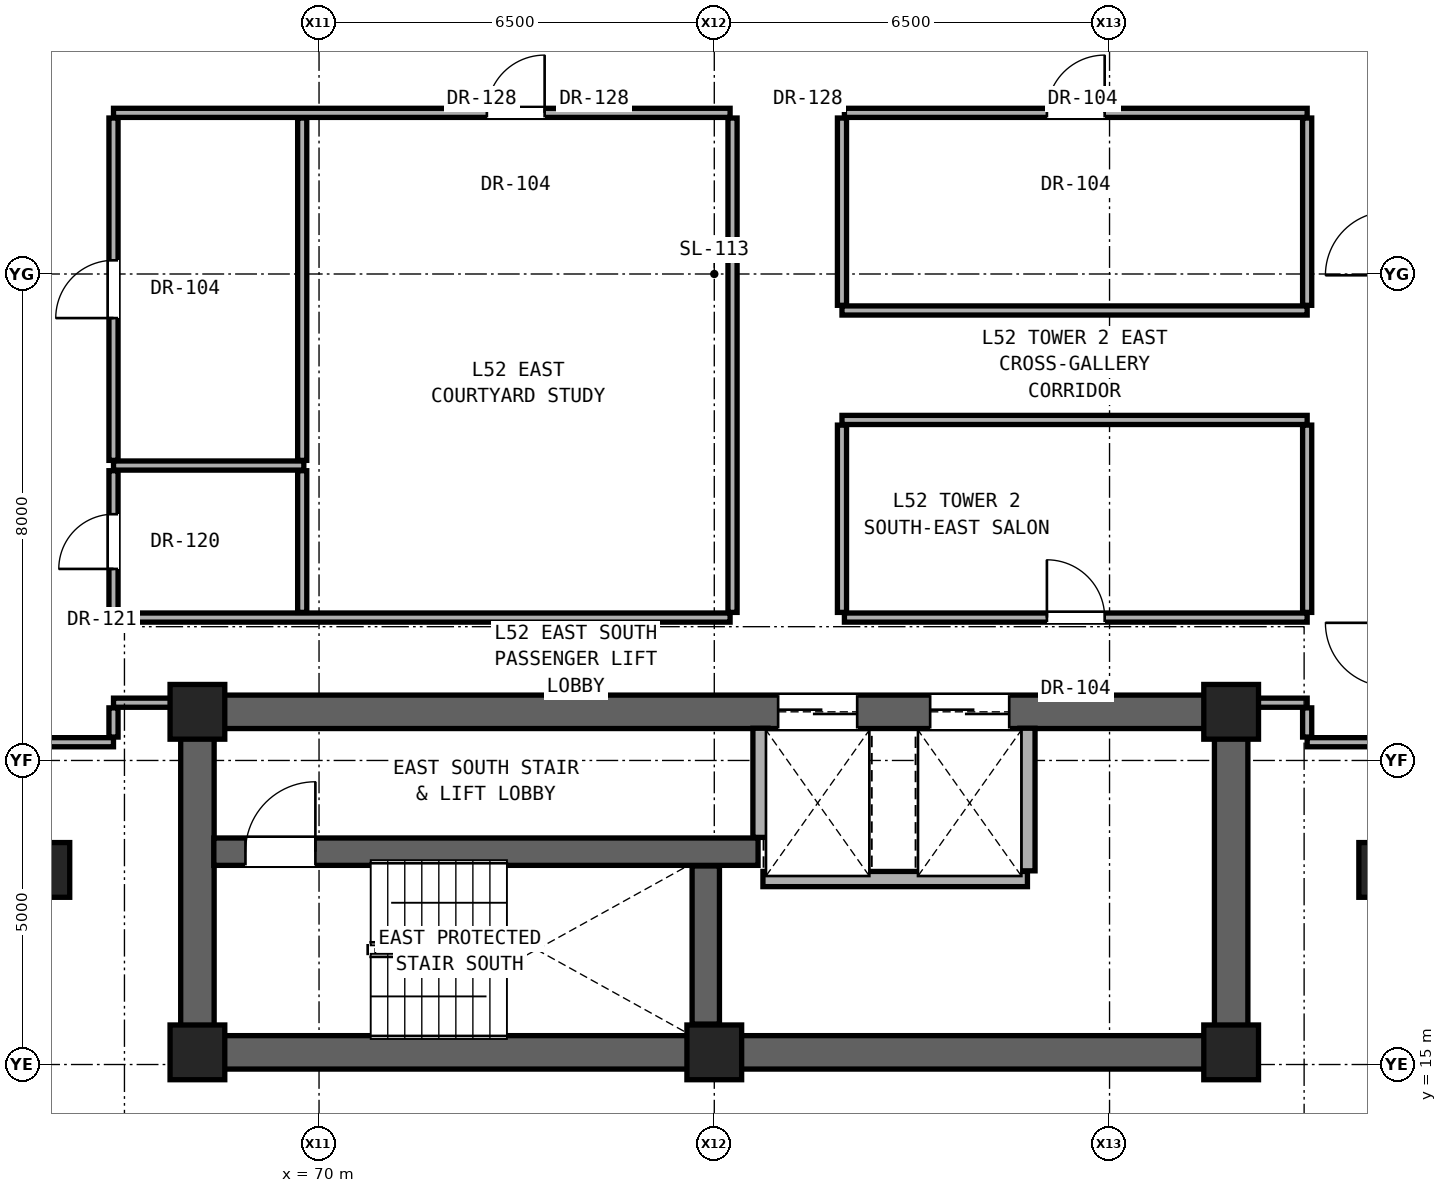
"""IFC4 building model, lengths in metres.
Left out: names, types, materials, properties, quantities, classifications, styles, units other than length and angle.
Written with IfcOpenShell. Run it as: python <this file> out.ifc"""

import sys

from ifc_helpers import new_model, si_unit, direction, frame, frame_2d, origin, origin_2d, place, context, subcontext, project, spatial, rectangle, extrude, element, fill, save


model = new_model("IFC4")
c1 = context("Model", 3, precision=1e-05, world=origin(), true_north=direction((0.0, 1.0)))
c2 = subcontext(c1, "Body", "Model", "MODEL_VIEW")
j1 = project(units=[si_unit("LENGTHUNIT", "METRE"), si_unit("PLANEANGLEUNIT", "RADIAN")], contexts=[c1])
p1 = place(None, origin())
s1 = spatial("IfcSite", under=j1, at=p1, CompositionType="ELEMENT")
p2 = place(p1, origin())
s2 = spatial("IfcBuilding", under=s1, at=p2, CompositionType="ELEMENT")
p3 = place(p2, frame((0.0, 0.0, 183.65)))
s3 = spatial("IfcBuildingStorey", under=s2, at=p3, CompositionType="ELEMENT", Elevation=183.65)
for number, where, z_axis, x_axis in (
    (1, (68.0, 15.2, 0.0), (0.0, 0.0, 1.0), (1.0, 0.0, 0.0)),
    (2, (76.5, 15.2, 0.0), (0.0, 0.0, 1.0), (1.0, 0.0, 0.0)),
    (3, (85.0, 15.2, 0.0), (0.0, 0.0, 1.0), (1.0, 0.0, 0.0)),
    (4, (68.0, 20.8, 0.0), (0.0, 0.0, 1.0), (1.0, 0.0, 0.0)),
    (5, (85.0, 20.8, 0.0), (0.0, 0.0, 1.0), (1.0, 0.0, 0.0)),
):
    element("IfcColumn", number, at=place(p3, frame(where, z_axis=z_axis, x_axis=x_axis)), inside=s3, PredefinedType="COLUMN", context=c2, shape_type="SweptSolid", body=[
        extrude(rectangle(XDim=0.9, YDim=0.9, at=origin_2d()), origin(), (0.0, 0.0, 1.0), 3.25),
    ])
for number, where, z_axis, x_axis in (
    (6, (65.6, 18.2, 0.0), (0.0, 0.0, 1.0), (1.0, 0.0, 0.0)),
    (7, (87.4, 18.2, 0.0), (0.0, 0.0, 1.0), (1.0, 0.0, 0.0)),
):
    element("IfcColumn", number, at=place(p3, frame(where, z_axis=z_axis, x_axis=x_axis)), inside=s3, PredefinedType="PILASTER", context=c2, shape_type="SweptSolid", body=[
        extrude(rectangle(XDim=0.6, YDim=0.9, at=origin_2d()), origin(), (0.0, 0.0, 1.0), 3.25),
    ])
p4 = place(p3, frame((68.0, 15.2, 0.0), z_axis=(0.0, 0.0, 1.0), x_axis=(1.0, 0.0, 0.0)))
e8 = element("IfcWall", 8, at=p4, inside=s3, PredefinedType="SHEAR", context=c2, shape_type="SweptSolid", body=[
    extrude(rectangle(XDim=17.0, YDim=0.55, at=frame_2d((8.5, 0.0))), origin(), (0.0, 0.0, 1.0), 3.05),
])
for number, where, z_axis, x_axis in (
    (9, (68.0, 15.2, 0.0), (0.0, 0.0, 1.0), (0.0, 1.0, 0.0)),
    (10, (85.0, 15.2, 0.0), (0.0, 0.0, 1.0), (0.0, 1.0, 0.0)),
):
    element("IfcWall", number, at=place(p3, frame(where, z_axis=z_axis, x_axis=x_axis)), inside=s3, PredefinedType="SHEAR", context=c2, shape_type="SweptSolid", body=[
        extrude(rectangle(XDim=5.6, YDim=0.55, at=frame_2d((2.8, 0.0))), origin(), (0.0, 0.0, 1.0), 3.05),
    ])
p5 = place(p3, frame((68.0, 20.8, 0.0), z_axis=(0.0, 0.0, 1.0), x_axis=(1.0, 0.0, 0.0)))
e11 = element("IfcWall", 11, at=p5, inside=s3, PredefinedType="SHEAR", context=c2, shape_type="SweptSolid", body=[
    extrude(rectangle(XDim=17.0, YDim=0.55, at=frame_2d((8.5, 0.0))), origin(), (0.0, 0.0, 1.0), 3.05),
])
p6 = place(p5, frame((9.55, 0.0, 0.0)))
e12 = element("IfcOpeningElement", 12, at=p6, cuts=e11, PredefinedType="OPENING", context=c2, shape_type="SweptSolid", body=[
    extrude(rectangle(XDim=1.3, YDim=2.3, at=frame_2d((0.65, 1.15))), frame((0.0, 0.285, 0.0), z_axis=(0.0, -1.0, 0.0), x_axis=(1.0, 0.0, 0.0)), (0.0, 0.0, 1.0), 0.57),
])
p7 = place(p5, frame((12.05, 0.0, 0.0)))
e13 = element("IfcOpeningElement", 13, at=p7, cuts=e11, PredefinedType="OPENING", context=c2, shape_type="SweptSolid", body=[
    extrude(rectangle(XDim=1.3, YDim=2.3, at=frame_2d((0.65, 1.15))), frame((0.0, 0.285, 0.0), z_axis=(0.0, -1.0, 0.0), x_axis=(1.0, 0.0, 0.0)), (0.0, 0.0, 1.0), 0.57),
])
p8 = place(p3, frame((77.3, 18.05, 0.0), z_axis=(0.0, 0.0, 1.0), x_axis=(1.0, 0.0, 0.0)))
e14 = element("IfcWall", 14, at=p8, inside=s3, PredefinedType="SOLIDWALL", context=c2, shape_type="SweptSolid", body=[
    extrude(rectangle(XDim=4.35, YDim=0.25, at=frame_2d((2.175, 0.0))), origin(), (0.0, 0.0, 1.0), 3.05),
])
p9 = place(p3, frame((68.27, 18.5, 0.0), z_axis=(0.0, 0.0, 1.0), x_axis=(1.0, 0.0, 0.0)))
e15 = element("IfcWall", 15, at=p9, inside=s3, PredefinedType="SHEAR", context=c2, shape_type="SweptSolid", body=[
    extrude(rectangle(XDim=8.95, YDim=0.45, at=frame_2d((4.475, 0.0))), origin(), (0.0, 0.0, 1.0), 3.05),
])
p10 = place(p9, frame((0.52, 0.0, 0.0)))
e16 = element("IfcOpeningElement", 16, at=p10, cuts=e15, PredefinedType="OPENING", context=c2, shape_type="SweptSolid", body=[
    extrude(rectangle(XDim=1.15, YDim=2.2, at=frame_2d((0.575, 1.1))), frame((0.0, 0.235, 0.0), z_axis=(0.0, -1.0, 0.0), x_axis=(1.0, 0.0, 0.0)), (0.0, 0.0, 1.0), 0.47),
])
p11 = place(p3, frame((65.25, 20.3, 0.0), z_axis=(0.0, 0.0, 1.0), x_axis=(1.0, 0.0, 0.0)))
e17 = element("IfcWall", 17, at=p11, inside=s3, PredefinedType="PARTITIONING", context=c2, shape_type="SweptSolid", body=[
    extrude(rectangle(XDim=1.37, YDim=0.15, at=frame_2d((0.685, 0.0))), origin(), (0.0, 0.0, 1.0), 3.05),
])
p12 = place(p3, frame((86.25, 20.3, 0.0), z_axis=(0.0, 0.0, 1.0), x_axis=(1.0, 0.0, 0.0)))
e18 = element("IfcWall", 18, at=p12, inside=s3, PredefinedType="PARTITIONING", context=c2, shape_type="SweptSolid", body=[
    extrude(rectangle(XDim=1.35, YDim=0.15, at=frame_2d((0.675, 0.0))), origin(), (0.0, 0.0, 1.0), 3.05),
])
p13 = place(p3, frame((66.62, 20.95, 0.0), z_axis=(0.0, 0.0, 1.0), x_axis=(1.0, 0.0, 0.0)))
e19 = element("IfcWall", 19, at=p13, inside=s3, PredefinedType="PARTITIONING", context=c2, shape_type="SweptSolid", body=[
    extrude(rectangle(XDim=1.11, YDim=0.15, at=frame_2d((0.555, 0.0))), origin(), (0.0, 0.0, 1.0), 2.442),
])
p14 = place(p3, frame((85.27, 20.95, 0.0), z_axis=(0.0, 0.0, 1.0), x_axis=(1.0, 0.0, 0.0)))
e20 = element("IfcWall", 20, at=p14, inside=s3, PredefinedType="PARTITIONING", context=c2, shape_type="SweptSolid", body=[
    extrude(rectangle(XDim=0.98, YDim=0.15, at=frame_2d((0.49, 0.0))), origin(), (0.0, 0.0, 1.0), 2.442),
])
p15 = place(p3, frame((66.62, 22.35, 0.0), z_axis=(0.0, 0.0, 1.0), x_axis=(1.0, 0.0, 0.0)))
e21 = element("IfcWall", 21, at=p15, inside=s3, PredefinedType="PARTITIONING", context=c2, shape_type="SweptSolid", body=[
    extrude(rectangle(XDim=10.14, YDim=0.15, at=frame_2d((5.07, 0.0))), origin(), (0.0, 0.0, 1.0), 2.186),
])
p16 = place(p3, frame((78.64, 22.35, 0.0), z_axis=(0.0, 0.0, 1.0), x_axis=(1.0, 0.0, 0.0)))
e22 = element("IfcWall", 22, at=p16, inside=s3, PredefinedType="PARTITIONING", context=c2, shape_type="SweptSolid", body=[
    extrude(rectangle(XDim=7.61, YDim=0.15, at=frame_2d((3.805, 0.0))), origin(), (0.0, 0.0, 1.0), 2.186),
])
p17 = place(p16, frame((3.33, 0.0, 0.0)))
e23 = element("IfcOpeningElement", 23, at=p17, cuts=e22, PredefinedType="OPENING", context=c2, shape_type="SweptSolid", body=[
    extrude(rectangle(XDim=0.95, YDim=2.15, at=frame_2d((0.475, 1.075))), frame((0.0, 0.085, 0.0), z_axis=(0.0, -1.0, 0.0), x_axis=(1.0, 0.0, 0.0)), (0.0, 0.0, 1.0), 0.17),
])
p18 = place(p3, frame((66.62, 24.85, 0.0), z_axis=(0.0, 0.0, 1.0), x_axis=(1.0, 0.0, 0.0)))
e24 = element("IfcWall", 24, at=p18, inside=s3, PredefinedType="PARTITIONING", context=c2, shape_type="SweptSolid", body=[
    extrude(rectangle(XDim=3.13, YDim=0.15, at=frame_2d((1.565, 0.0))), origin(), (0.0, 0.0, 1.0), 2.186),
])
for number, where, z_axis, x_axis in (
    (25, (78.6, 25.6, 0.0), (0.0, 0.0, 1.0), (1.0, 0.0, 0.0)),
    (26, (78.6, 27.4, 0.0), (0.0, 0.0, 1.0), (1.0, 0.0, 0.0)),
):
    element("IfcWall", number, at=place(p3, frame(where, z_axis=z_axis, x_axis=x_axis)), inside=s3, PredefinedType="PARTITIONING", context=c2, shape_type="SweptSolid", body=[
        extrude(rectangle(XDim=7.65, YDim=0.15, at=frame_2d((3.825, 0.0))), origin(), (0.0, 0.0, 1.0), 2.186),
    ])
p19 = place(p3, frame((66.62, 30.65, 0.0), z_axis=(0.0, 0.0, 1.0), x_axis=(1.0, 0.0, 0.0)))
e27 = element("IfcWall", 27, at=p19, inside=s3, PredefinedType="PARTITIONING", context=c2, shape_type="SweptSolid", body=[
    extrude(rectangle(XDim=10.14, YDim=0.15, at=frame_2d((5.07, 0.0))), origin(), (0.0, 0.0, 1.0), 2.186),
])
p20 = place(p19, frame((6.14, 0.0, 0.0)))
e28 = element("IfcOpeningElement", 28, at=p20, cuts=e27, PredefinedType="OPENING", context=c2, shape_type="SweptSolid", body=[
    extrude(rectangle(XDim=0.95, YDim=2.15, at=frame_2d((0.475, 1.075))), frame((0.0, 0.085, 0.0), z_axis=(0.0, -1.0, 0.0), x_axis=(1.0, 0.0, 0.0)), (0.0, 0.0, 1.0), 0.17),
])
p21 = place(p3, frame((78.64, 30.65, 0.0), z_axis=(0.0, 0.0, 1.0), x_axis=(1.0, 0.0, 0.0)))
e29 = element("IfcWall", 29, at=p21, inside=s3, PredefinedType="PARTITIONING", context=c2, shape_type="SweptSolid", body=[
    extrude(rectangle(XDim=7.61, YDim=0.15, at=frame_2d((3.805, 0.0))), origin(), (0.0, 0.0, 1.0), 2.186),
])
p22 = place(p21, frame((3.33, 0.0, 0.0)))
e30 = element("IfcOpeningElement", 30, at=p22, cuts=e29, PredefinedType="OPENING", context=c2, shape_type="SweptSolid", body=[
    extrude(rectangle(XDim=0.95, YDim=2.15, at=frame_2d((0.475, 1.075))), frame((0.0, 0.085, 0.0), z_axis=(0.0, -1.0, 0.0), x_axis=(1.0, 0.0, 0.0)), (0.0, 0.0, 1.0), 0.17),
])
p23 = place(p3, frame((66.62, 20.385, 0.0), z_axis=(0.0, 0.0, 1.0), x_axis=(0.0, 1.0, 0.0)))
e31 = element("IfcWall", 31, at=p23, inside=s3, PredefinedType="PARTITIONING", context=c2, shape_type="SweptSolid", body=[
    extrude(rectangle(XDim=0.48, YDim=0.15, at=frame_2d((0.24, 0.0))), origin(), (0.0, 0.0, 1.0), 2.442),
])
p24 = place(p3, frame((66.62, 22.435, 0.0), z_axis=(0.0, 0.0, 1.0), x_axis=(0.0, 1.0, 0.0)))
e32 = element("IfcWall", 32, at=p24, inside=s3, PredefinedType="PARTITIONING", context=c2, shape_type="SweptSolid", body=[
    extrude(rectangle(XDim=2.33, YDim=0.15, at=frame_2d((1.165, 0.0))), origin(), (0.0, 0.0, 1.0), 3.05),
])
p25 = place(p24, frame((0.715, 0.0, 0.0)))
e33 = element("IfcOpeningElement", 33, at=p25, cuts=e32, PredefinedType="OPENING", context=c2, shape_type="SweptSolid", body=[
    extrude(rectangle(XDim=0.9, YDim=2.1, at=frame_2d((0.45, 1.05))), frame((0.0, 0.085, 0.0), z_axis=(0.0, -1.0, 0.0), x_axis=(1.0, 0.0, 0.0)), (0.0, 0.0, 1.0), 0.17),
])
p26 = place(p3, frame((66.62, 24.935, 0.0), z_axis=(0.0, 0.0, 1.0), x_axis=(0.0, 1.0, 0.0)))
e34 = element("IfcWall", 34, at=p26, inside=s3, PredefinedType="PARTITIONING", context=c2, shape_type="SweptSolid", body=[
    extrude(rectangle(XDim=5.63, YDim=0.15, at=frame_2d((2.815, 0.0))), origin(), (0.0, 0.0, 1.0), 2.346),
])
p27 = place(p26, frame((2.34, 0.0, 0.0)))
e35 = element("IfcOpeningElement", 35, at=p27, cuts=e34, PredefinedType="OPENING", context=c2, shape_type="SweptSolid", body=[
    extrude(rectangle(XDim=0.95, YDim=2.15, at=frame_2d((0.475, 1.075))), frame((0.0, 0.085, 0.0), z_axis=(0.0, -1.0, 0.0), x_axis=(1.0, 0.0, 0.0)), (0.0, 0.0, 1.0), 0.17),
])
p28 = place(p3, frame((69.723, 22.435, 0.0), z_axis=(0.0, 0.0, 1.0), x_axis=(0.0, 1.0, 0.0)))
e36 = element("IfcWall", 36, at=p28, inside=s3, PredefinedType="PARTITIONING", context=c2, shape_type="SweptSolid", body=[
    extrude(rectangle(XDim=2.33, YDim=0.15, at=frame_2d((1.165, 0.0))), origin(), (0.0, 0.0, 1.0), 3.05),
])
p29 = place(p3, frame((69.723, 24.935, 0.0), z_axis=(0.0, 0.0, 1.0), x_axis=(0.0, 1.0, 0.0)))
e37 = element("IfcWall", 37, at=p29, inside=s3, PredefinedType="PARTITIONING", context=c2, shape_type="SweptSolid", body=[
    extrude(rectangle(XDim=5.63, YDim=0.15, at=frame_2d((2.815, 0.0))), origin(), (0.0, 0.0, 1.0), 2.186),
])
p30 = place(p3, frame((76.36, 15.665, 0.0), z_axis=(0.0, 0.0, 1.0), x_axis=(0.0, 1.0, 0.0)))
e38 = element("IfcWall", 38, at=p30, inside=s3, PredefinedType="SHEAR", context=c2, shape_type="SweptSolid", body=[
    extrude(rectangle(XDim=2.6, YDim=0.45, at=frame_2d((1.3, 0.0))), origin(), (0.0, 0.0, 1.0), 3.05),
])
p31 = place(p3, frame((76.8, 22.435, 0.0), z_axis=(0.0, 0.0, 1.0), x_axis=(0.0, 1.0, 0.0)))
e39 = element("IfcWall", 39, at=p31, inside=s3, PredefinedType="PARTITIONING", context=c2, shape_type="SweptSolid", body=[
    extrude(rectangle(XDim=8.13, YDim=0.15, at=frame_2d((4.065, 0.0))), origin(), (0.0, 0.0, 1.0), 2.186),
])
p32 = place(p3, frame((77.26, 18.735, 0.0), z_axis=(0.0, 0.0, 1.0), x_axis=(0.0, 1.0, 0.0)))
e40 = element("IfcWall", 40, at=p32, inside=s3, PredefinedType="SOLIDWALL", context=c2, shape_type="SweptSolid", body=[
    extrude(rectangle(XDim=1.795, YDim=0.25, at=frame_2d((0.897, 0.0))), origin(), (0.0, 0.0, 1.0), 3.05),
])
p33 = place(p3, frame((78.6, 22.435, 0.0), z_axis=(0.0, 0.0, 1.0), x_axis=(0.0, 1.0, 0.0)))
e41 = element("IfcWall", 41, at=p33, inside=s3, PredefinedType="PARTITIONING", context=c2, shape_type="SweptSolid", body=[
    extrude(rectangle(XDim=3.08, YDim=0.15, at=frame_2d((1.54, 0.0))), origin(), (0.0, 0.0, 1.0), 3.05),
])
p34 = place(p3, frame((78.6, 27.485, 0.0), z_axis=(0.0, 0.0, 1.0), x_axis=(0.0, 1.0, 0.0)))
e42 = element("IfcWall", 42, at=p34, inside=s3, PredefinedType="PARTITIONING", context=c2, shape_type="SweptSolid", body=[
    extrude(rectangle(XDim=3.08, YDim=0.15, at=frame_2d((1.54, 0.0))), origin(), (0.0, 0.0, 1.0), 2.186),
])
p35 = place(p3, frame((81.65, 18.185, 0.0), z_axis=(0.0, 0.0, 1.0), x_axis=(0.0, 1.0, 0.0)))
e43 = element("IfcWall", 43, at=p35, inside=s3, PredefinedType="SOLIDWALL", context=c2, shape_type="SweptSolid", body=[
    extrude(rectangle(XDim=2.345, YDim=0.25, at=frame_2d((1.172, 0.0))), origin(), (0.0, 0.0, 1.0), 3.05),
])
p36 = place(p3, frame((86.25, 20.385, 0.0), z_axis=(0.0, 0.0, 1.0), x_axis=(0.0, 1.0, 0.0)))
e44 = element("IfcWall", 44, at=p36, inside=s3, PredefinedType="PARTITIONING", context=c2, shape_type="SweptSolid", body=[
    extrude(rectangle(XDim=0.48, YDim=0.15, at=frame_2d((0.24, 0.0))), origin(), (0.0, 0.0, 1.0), 2.442),
])
p37 = place(p3, frame((86.25, 22.435, 0.0), z_axis=(0.0, 0.0, 1.0), x_axis=(0.0, 1.0, 0.0)))
e45 = element("IfcWall", 45, at=p37, inside=s3, PredefinedType="PARTITIONING", context=c2, shape_type="SweptSolid", body=[
    extrude(rectangle(XDim=3.08, YDim=0.15, at=frame_2d((1.54, 0.0))), origin(), (0.0, 0.0, 1.0), 3.05),
])
p38 = place(p3, frame((86.25, 27.485, 0.0), z_axis=(0.0, 0.0, 1.0), x_axis=(0.0, 1.0, 0.0)))
e46 = element("IfcWall", 46, at=p38, inside=s3, PredefinedType="PARTITIONING", context=c2, shape_type="SweptSolid", body=[
    extrude(rectangle(XDim=3.08, YDim=0.15, at=frame_2d((1.54, 0.0))), origin(), (0.0, 0.0, 1.0), 2.346),
])
p39 = place(p10, origin())
e47 = element("IfcDoor", 47, at=p39, inside=s3, OperationType="SINGLE_SWING_RIGHT", PredefinedType="DOOR", context=c2, shape_type="SweptSolid", body=[
    extrude(rectangle(XDim=1.15, YDim=2.2, at=frame_2d((0.575, 1.1))), frame((0.0, 0.025, 0.0), z_axis=(0.0, -1.0, 0.0), x_axis=(1.0, 0.0, 0.0)), (0.0, 0.0, 1.0), 0.05),
])
fill(e16, e47)
p40 = place(p25, origin())
e48 = element("IfcDoor", 48, at=p40, inside=s3, OperationType="SINGLE_SWING_LEFT", PredefinedType="DOOR", context=c2, shape_type="SweptSolid", body=[
    extrude(rectangle(XDim=0.9, YDim=2.1, at=frame_2d((0.45, 1.05))), frame((0.0, 0.025, 0.0), z_axis=(0.0, -1.0, 0.0), x_axis=(1.0, 0.0, 0.0)), (0.0, 0.0, 1.0), 0.05),
])
fill(e33, e48)
p41 = place(p27, origin())
e49 = element("IfcDoor", 49, at=p41, inside=s3, OperationType="SINGLE_SWING_LEFT", PredefinedType="DOOR", context=c2, shape_type="SweptSolid", body=[
    extrude(rectangle(XDim=0.95, YDim=2.15, at=frame_2d((0.475, 1.075))), frame((0.0, 0.025, 0.0), z_axis=(0.0, -1.0, 0.0), x_axis=(1.0, 0.0, 0.0)), (0.0, 0.0, 1.0), 0.05),
])
fill(e35, e49)
p42 = place(p20, origin())
e50 = element("IfcDoor", 50, at=p42, inside=s3, OperationType="SINGLE_SWING_RIGHT", PredefinedType="DOOR", context=c2, shape_type="SweptSolid", body=[
    extrude(rectangle(XDim=0.95, YDim=2.15, at=frame_2d((0.475, 1.075))), frame((0.0, 0.025, 0.0), z_axis=(0.0, -1.0, 0.0), x_axis=(1.0, 0.0, 0.0)), (0.0, 0.0, 1.0), 0.05),
])
fill(e28, e50)
p43 = place(p17, origin())
e51 = element("IfcDoor", 51, at=p43, inside=s3, OperationType="SINGLE_SWING_LEFT", PredefinedType="DOOR", context=c2, shape_type="SweptSolid", body=[
    extrude(rectangle(XDim=0.95, YDim=2.15, at=frame_2d((0.475, 1.075))), frame((0.0, 0.025, 0.0), z_axis=(0.0, -1.0, 0.0), x_axis=(1.0, 0.0, 0.0)), (0.0, 0.0, 1.0), 0.05),
])
fill(e23, e51)
p44 = place(p22, origin())
e52 = element("IfcDoor", 52, at=p44, inside=s3, OperationType="SINGLE_SWING_RIGHT", PredefinedType="DOOR", context=c2, shape_type="SweptSolid", body=[
    extrude(rectangle(XDim=0.95, YDim=2.15, at=frame_2d((0.475, 1.075))), frame((0.0, 0.025, 0.0), z_axis=(0.0, -1.0, 0.0), x_axis=(1.0, 0.0, 0.0)), (0.0, 0.0, 1.0), 0.05),
])
fill(e30, e52)
p45 = place(p6, origin())
e53 = element("IfcDoor", 53, at=p45, inside=s3, OperationType="DOUBLE_DOOR_SLIDING", PredefinedType="DOOR", context=c2, shape_type="SweptSolid", body=[
    extrude(rectangle(XDim=1.3, YDim=2.3, at=frame_2d((0.65, 1.15))), frame((0.0, 0.025, 0.0), z_axis=(0.0, -1.0, 0.0), x_axis=(1.0, 0.0, 0.0)), (0.0, 0.0, 1.0), 0.05),
])
fill(e12, e53)
p46 = place(p7, origin())
e54 = element("IfcDoor", 54, at=p46, inside=s3, OperationType="DOUBLE_DOOR_SLIDING", PredefinedType="DOOR", context=c2, shape_type="SweptSolid", body=[
    extrude(rectangle(XDim=1.3, YDim=2.3, at=frame_2d((0.65, 1.15))), frame((0.0, 0.025, 0.0), z_axis=(0.0, -1.0, 0.0), x_axis=(1.0, 0.0, 0.0)), (0.0, 0.0, 1.0), 0.05),
])
fill(e13, e54)
save(model, sys.argv[1])
